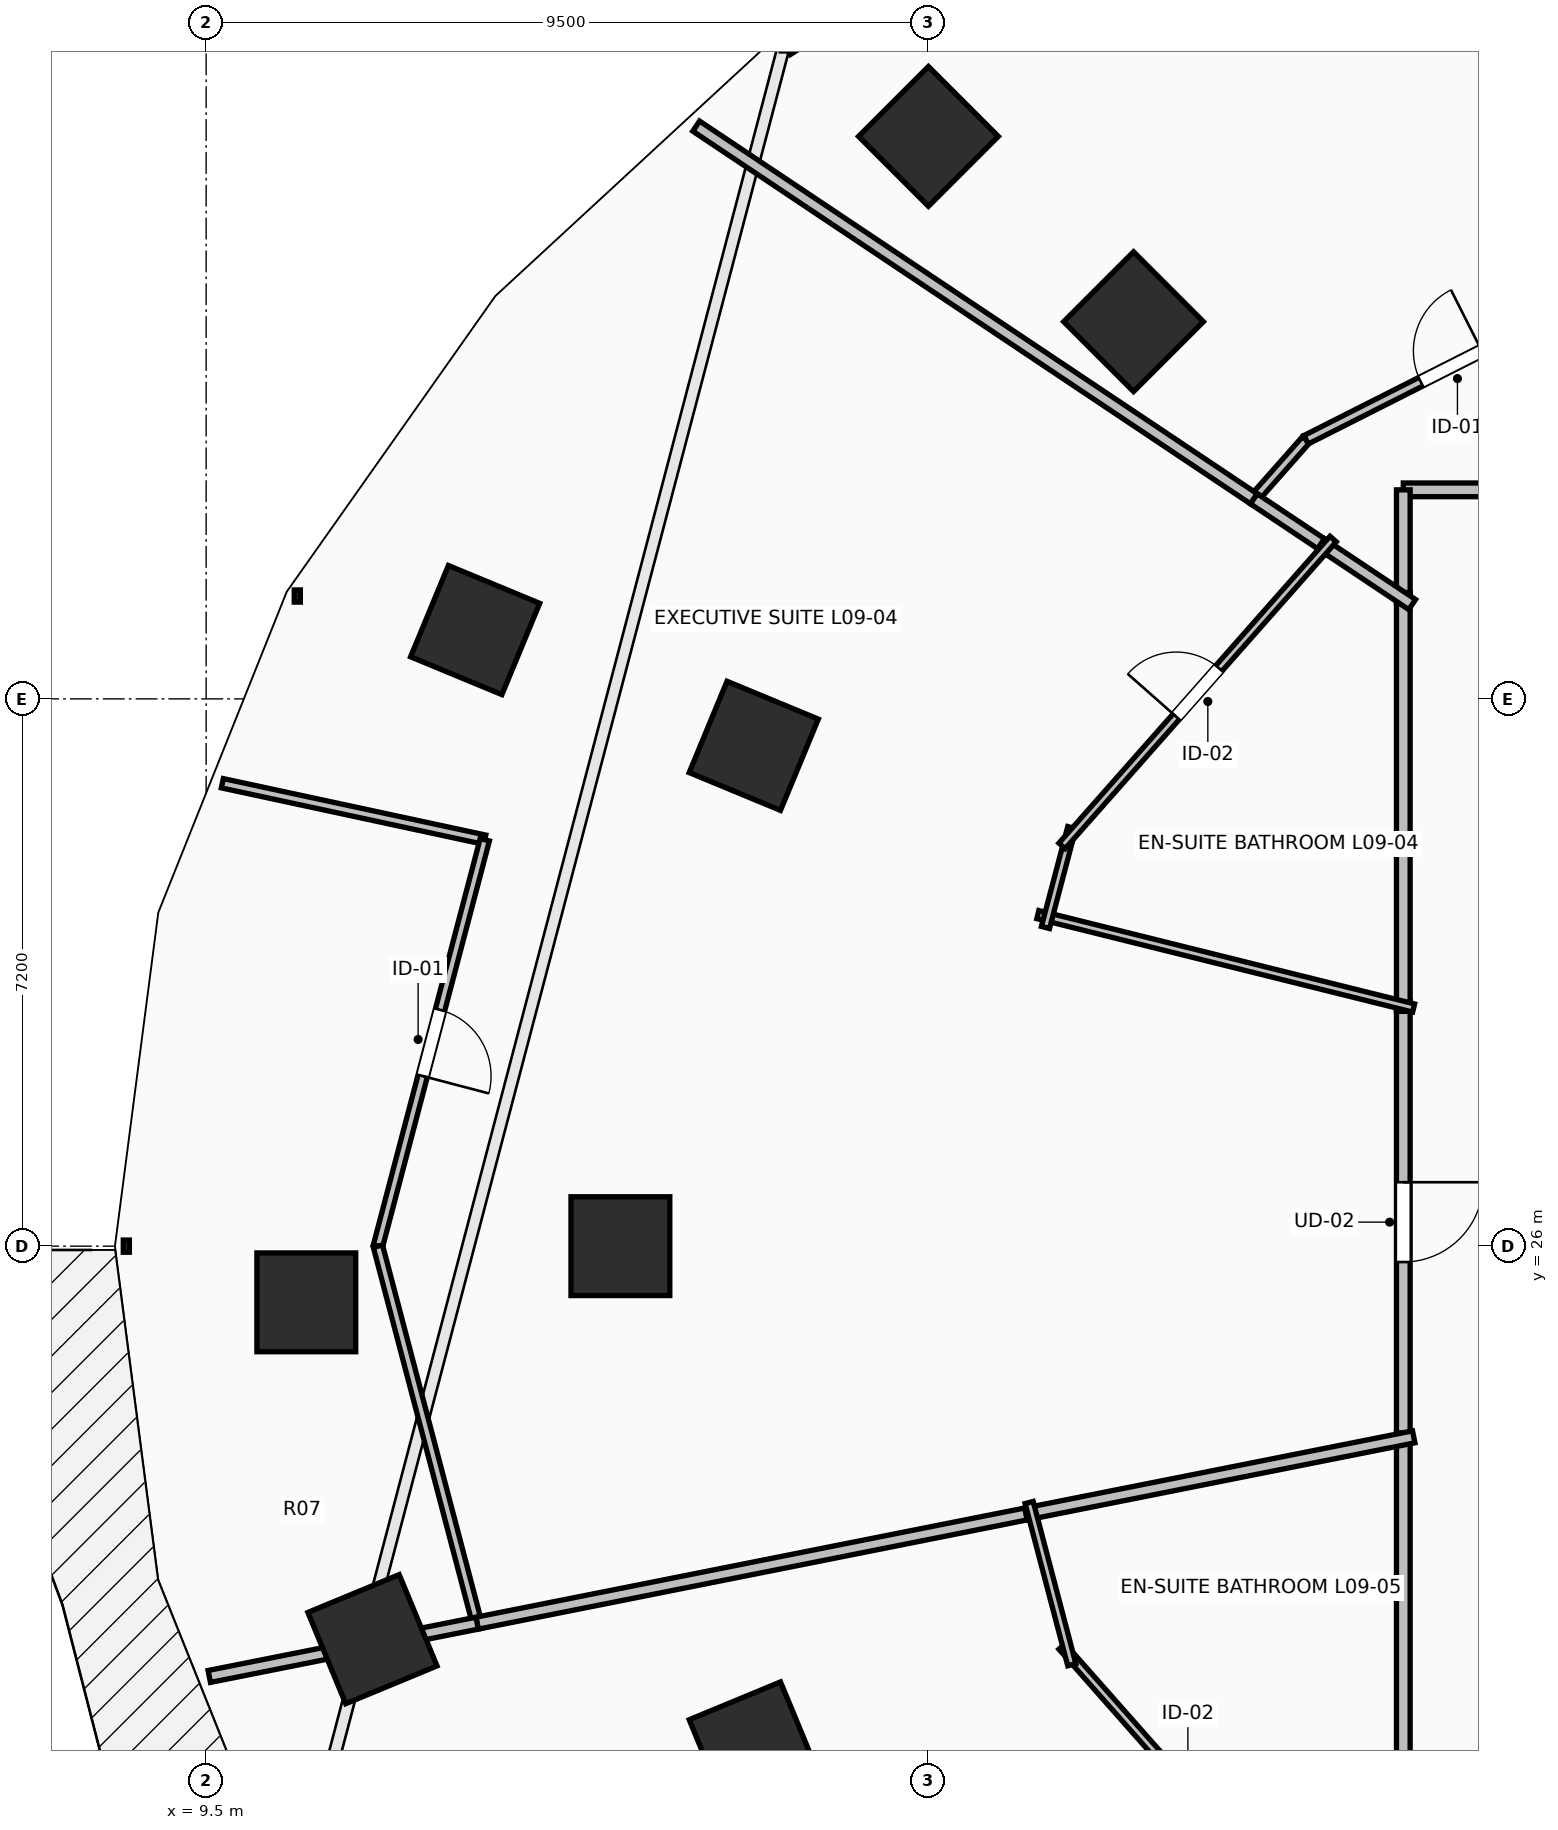
"""IFC4 building model, lengths in metres.
Left out: names, types, materials, properties, quantities, classifications, styles, units other than length and angle.
Written with IfcOpenShell. Run it as: python <this file> out.ifc"""

import sys

from ifc_helpers import new_model, si_unit, direction, frame, frame_2d, origin, origin_2d, place, context, subcontext, project, spatial, rectangle, extrude, element, fill, save


model = new_model("IFC4")
c1 = context("Model", 3, precision=1e-05, world=origin(), true_north=direction((0.0, 1.0)))
c2 = subcontext(c1, "Body", "Model", "MODEL_VIEW")
j1 = project(units=[si_unit("LENGTHUNIT", "METRE"), si_unit("PLANEANGLEUNIT", "RADIAN")], contexts=[c1])
p1 = place(None, origin())
s1 = spatial("IfcSite", under=j1, at=p1, CompositionType="ELEMENT")
p2 = place(p1, origin())
s2 = spatial("IfcBuilding", under=s1, at=p2, CompositionType="ELEMENT")
p3 = place(p2, frame((0.0, 0.0, 38.0)))
s3 = spatial("IfcBuildingStorey", under=s2, at=p3, CompositionType="ELEMENT", Elevation=38.0)
for number, where, z_axis, x_axis in (
    (1, (21.701, 38.162, 0.0), (0.0, 0.0, 1.0), (-0.707, 0.707, 0.0)),
    (2, (16.705, 32.582, 0.0), (0.0, 0.0, 1.0), (-0.924, 0.383, 0.0)),
    (3, (14.95, 26.0, 0.0), (0.0, 0.0, 1.0), (-1.0, 0.0, 0.0)),
    (4, (16.705, 19.418, 0.0), (0.0, 0.0, 1.0), (-0.924, -0.383, 0.0)),
    (5, (19.003, 40.6, 0.0), (0.0, 0.0, 1.0), (-0.707, 0.707, 0.0)),
    (6, (13.039, 34.105, 0.0), (0.0, 0.0, 1.0), (-0.924, 0.383, 0.0)),
    (7, (10.818, 25.261, 0.0), (0.0, 0.0, 1.0), (-1.0, 0.0, 0.0)),
    (8, (11.688, 20.83, 0.0), (0.0, 0.0, 1.0), (-0.924, -0.383, 0.0)),
):
    element("IfcColumn", number, at=place(p3, frame(where, z_axis=z_axis, x_axis=x_axis)), inside=s3, PredefinedType="COLUMN", context=c2, shape_type="SweptSolid", body=[
        extrude(rectangle(XDim=1.3, YDim=1.3, at=origin_2d()), origin(), (0.0, 0.0, 1.0), 3.5),
    ])
p4 = place(p3, frame((21.583, 44.583, 0.0), z_axis=(0.0, 0.0, 1.0), x_axis=(-0.849633724826, -0.527373239404, 0.0)))
e9 = element("IfcWall", 9, at=p4, inside=s3, PredefinedType="STANDARD", context=c2, shape_type="SweptSolid", body=[
    extrude(rectangle(XDim=5.271, YDim=0.3, at=frame_2d((2.635, 0.0))), origin(), (0.0, 0.0, 1.0), 3.24),
])
p5 = place(p4, frame((1.885, 0.0, 0.85)))
e10 = element("IfcOpeningElement", 10, at=p5, cuts=e9, PredefinedType="OPENING", context=c2, shape_type="SweptSolid", body=[
    extrude(rectangle(XDim=1.5, YDim=2.19, at=frame_2d((0.75, 1.095))), frame((0.0, 0.165, 0.0), z_axis=(0.0, -1.0, 0.0), x_axis=(1.0, 0.0, 0.0)), (0.0, 0.0, 1.0), 0.33),
])
p6 = place(p3, frame((29.822, 35.95, 0.0), z_axis=(0.0, 0.0, 1.0), x_axis=(-1.0, 0.0, 0.0)))
e11 = element("IfcWall", 11, at=p6, inside=s3, PredefinedType="PARTITIONING", context=c2, shape_type="SweptSolid", body=[
    extrude(rectangle(XDim=4.572, YDim=0.18, at=frame_2d((2.286, 0.0))), origin(), (0.0, 0.0, 1.0), 2.432),
])
p7 = place(p6, frame((1.786, 0.0, 0.0)))
e12 = element("IfcOpeningElement", 12, at=p7, cuts=e11, PredefinedType="OPENING", context=c2, shape_type="SweptSolid", body=[
    extrude(rectangle(XDim=1.0, YDim=2.15, at=frame_2d((0.5, 1.075))), frame((0.0, 0.105, 0.0), z_axis=(0.0, -1.0, 0.0), x_axis=(1.0, 0.0, 0.0)), (0.0, 0.0, 1.0), 0.21),
])
p8 = place(p3, frame((25.25, 35.95, 0.0), z_axis=(0.0, 0.0, 1.0), x_axis=(0.0, -1.0, 0.0)))
e13 = element("IfcWall", 13, at=p8, inside=s3, PredefinedType="PARTITIONING", context=c2, shape_type="SweptSolid", body=[
    extrude(rectangle(XDim=1.491, YDim=0.18, at=frame_2d((0.746, 0.0))), origin(), (0.0, 0.0, 1.0), 2.432),
])
p9 = place(p3, frame((25.25, 29.229, 0.0), z_axis=(0.0, 0.0, 1.0), x_axis=(0.0, -1.0, 0.0)))
e14 = element("IfcWall", 14, at=p9, inside=s3, PredefinedType="PARTITIONING", context=c2, shape_type="SweptSolid", body=[
    extrude(rectangle(XDim=5.826, YDim=0.18, at=frame_2d((2.913, 0.0))), origin(), (0.0, 0.0, 1.0), 2.432),
])
p10 = place(p9, frame((2.388, 0.0, 0.0)))
e15 = element("IfcOpeningElement", 15, at=p10, cuts=e14, PredefinedType="OPENING", context=c2, shape_type="SweptSolid", body=[
    extrude(rectangle(XDim=1.05, YDim=2.2, at=frame_2d((0.525, 1.1))), frame((0.0, 0.105, 0.0), z_axis=(0.0, -1.0, 0.0), x_axis=(1.0, 0.0, 0.0)), (0.0, 0.0, 1.0), 0.21),
])
p11 = place(p3, frame((25.25, 34.599, 0.0), z_axis=(0.0, 0.0, 1.0), x_axis=(0.0, -1.0, 0.0)))
e16 = element("IfcWall", 16, at=p11, inside=s3, PredefinedType="PARTITIONING", context=c2, shape_type="SweptSolid", body=[
    extrude(rectangle(XDim=5.51, YDim=0.18, at=frame_2d((2.755, 0.0))), origin(), (0.0, 0.0, 1.0), 2.432),
])
p12 = place(p3, frame((25.25, 23.543, 0.0), z_axis=(0.0, 0.0, 1.0), x_axis=(0.0, -1.0, 0.0)))
e17 = element("IfcWall", 17, at=p12, inside=s3, PredefinedType="PARTITIONING", context=c2, shape_type="SweptSolid", body=[
    extrude(rectangle(XDim=5.299, YDim=0.18, at=frame_2d((2.649, 0.0))), origin(), (0.0, 0.0, 1.0), 3.24),
])
p13 = place(p3, frame((23.284, 35.832, 0.0), z_axis=(0.0, 0.0, 1.0), x_axis=(0.662462125237, 0.749095409561, 0.0)))
e18 = element("IfcWall", 18, at=p13, inside=s3, PredefinedType="PARTITIONING", context=c2, shape_type="SweptSolid", body=[
    extrude(rectangle(XDim=1.037, YDim=0.125, at=frame_2d((0.519, 0.0))), origin(), (0.0, 0.0, 1.0), 2.432),
])
p14 = place(p3, frame((23.971, 36.609, 0.0), z_axis=(0.0, 0.0, 1.0), x_axis=(0.892445030909, 0.451156144596, 0.0)))
e19 = element("IfcWall", 19, at=p14, inside=s3, PredefinedType="PARTITIONING", context=c2, shape_type="SweptSolid", body=[
    extrude(rectangle(XDim=4.281, YDim=0.125, at=frame_2d((2.14, 0.0))), origin(), (0.0, 0.0, 1.0), 3.24),
])
p15 = place(p14, frame((1.69, 0.0, 0.0)))
e20 = element("IfcOpeningElement", 20, at=p15, cuts=e19, PredefinedType="OPENING", context=c2, shape_type="SweptSolid", body=[
    extrude(rectangle(XDim=0.9, YDim=2.1, at=frame_2d((0.45, 1.05))), frame((0.0, 0.077, 0.0), z_axis=(0.0, -1.0, 0.0), x_axis=(1.0, 0.0, 0.0)), (0.0, 0.0, 1.0), 0.155),
])
p16 = place(p3, frame((15.947, 40.735, 0.0), z_axis=(0.0, 0.0, 1.0), x_axis=(0.831432604336, -0.555625615363, 0.0)))
e21 = element("IfcWall", 21, at=p16, inside=s3, PredefinedType="PARTITIONING", context=c2, shape_type="SweptSolid", body=[
    extrude(rectangle(XDim=8.824, YDim=0.16, at=frame_2d((4.412, 0.0))), origin(), (0.0, 0.0, 1.0), 2.624),
])
p17 = place(p3, frame((23.284, 35.832, 0.0), z_axis=(0.0, 0.0, 1.0), x_axis=(0.831550226979, -0.555449565677, 0.0)))
e22 = element("IfcWall", 22, at=p17, inside=s3, PredefinedType="PARTITIONING", context=c2, shape_type="SweptSolid", body=[
    extrude(rectangle(XDim=1.203, YDim=0.16, at=frame_2d((0.601, 0.0))), origin(), (0.0, 0.0, 1.0), 2.972),
])
p18 = place(p3, frame((24.167, 35.241, 0.0), z_axis=(0.0, 0.0, 1.0), x_axis=(0.831815696492, -0.555051931868, 0.0)))
e23 = element("IfcWall", 23, at=p18, inside=s3, PredefinedType="PARTITIONING", context=c2, shape_type="SweptSolid", body=[
    extrude(rectangle(XDim=1.441, YDim=0.16, at=frame_2d((0.721, 0.0))), origin(), (0.0, 0.0, 1.0), 2.972),
])
p19 = place(p3, frame((25.386, 29.133, 0.0), z_axis=(0.0, 0.0, 1.0), x_axis=(-0.970485458541, 0.241159645796, 0.0)))
e24 = element("IfcWall", 24, at=p19, inside=s3, PredefinedType="PARTITIONING", context=c2, shape_type="SweptSolid", body=[
    extrude(rectangle(XDim=5.094, YDim=0.11, at=frame_2d((2.547, 0.0))), origin(), (0.0, 0.0, 1.0), 2.432),
])
p20 = place(p3, frame((20.542, 30.193, 0.0), z_axis=(0.0, 0.0, 1.0), x_axis=(0.254988593673, 0.966944060997, 0.0)))
e25 = element("IfcWall", 25, at=p20, inside=s3, PredefinedType="PARTITIONING", context=c2, shape_type="SweptSolid", body=[
    extrude(rectangle(XDim=1.359, YDim=0.11, at=frame_2d((0.679, 0.0))), origin(), (0.0, 0.0, 1.0), 2.432),
])
p21 = place(p3, frame((20.76, 31.266, 0.0), z_axis=(0.0, 0.0, 1.0), x_axis=(0.662087707802, 0.749426358742, 0.0)))
e26 = element("IfcWall", 26, at=p21, inside=s3, PredefinedType="PARTITIONING", context=c2, shape_type="SweptSolid", body=[
    extrude(rectangle(XDim=5.387, YDim=0.11, at=frame_2d((2.693, 0.0))), origin(), (0.0, 0.0, 1.0), 2.972),
])
p22 = place(p21, frame((2.268, 0.0, 0.0)))
e27 = element("IfcOpeningElement", 27, at=p22, cuts=e26, PredefinedType="OPENING", context=c2, shape_type="SweptSolid", body=[
    extrude(rectangle(XDim=0.85, YDim=2.1, at=frame_2d((0.425, 1.05))), frame((0.0, 0.07, 0.0), z_axis=(0.0, -1.0, 0.0), x_axis=(1.0, 0.0, 0.0)), (0.0, 0.0, 1.0), 0.14),
])
p23 = place(p3, frame((9.713, 32.09, 0.0), z_axis=(0.0, 0.0, 1.0), x_axis=(0.977615913399, -0.210397542448, 0.0)))
e28 = element("IfcWall", 28, at=p23, inside=s3, PredefinedType="PARTITIONING", context=c2, shape_type="SweptSolid", body=[
    extrude(rectangle(XDim=3.532, YDim=0.125, at=frame_2d((1.766, 0.0))), origin(), (0.0, 0.0, 1.0), 2.624),
])
p24 = place(p3, frame((13.166, 31.347, 0.0), z_axis=(0.0, 0.0, 1.0), x_axis=(-0.25431071056, -0.967122568496, 0.0)))
e29 = element("IfcWall", 29, at=p24, inside=s3, PredefinedType="PARTITIONING", context=c2, shape_type="SweptSolid", body=[
    extrude(rectangle(XDim=5.529, YDim=0.125, at=frame_2d((2.764, 0.0))), origin(), (0.0, 0.0, 1.0), 3.24),
])
p25 = place(p24, frame((2.314, 0.0, 0.0)))
e30 = element("IfcOpeningElement", 30, at=p25, cuts=e29, PredefinedType="OPENING", context=c2, shape_type="SweptSolid", body=[
    extrude(rectangle(XDim=0.9, YDim=2.1, at=frame_2d((0.45, 1.05))), frame((0.0, 0.077, 0.0), z_axis=(0.0, -1.0, 0.0), x_axis=(1.0, 0.0, 0.0)), (0.0, 0.0, 1.0), 0.155),
])
p26 = place(p3, frame((11.76, 26.0, 0.0), z_axis=(0.0, 0.0, 1.0), x_axis=(0.254434720755, -0.967089950767, 0.0)))
e31 = element("IfcWall", 31, at=p26, inside=s3, PredefinedType="PARTITIONING", context=c2, shape_type="SweptSolid", body=[
    extrude(rectangle(XDim=5.129, YDim=0.125, at=frame_2d((2.564, 0.0))), origin(), (0.0, 0.0, 1.0), 2.432),
])
p27 = place(p3, frame((13.065, 21.04, 0.0), z_axis=(0.0, 0.0, 1.0), x_axis=(0.980774220135, 0.195145917502, 0.0)))
e32 = element("IfcWall", 32, at=p27, inside=s3, PredefinedType="PARTITIONING", context=c2, shape_type="SweptSolid", body=[
    extrude(rectangle(XDim=7.501, YDim=0.16, at=frame_2d((3.751, 0.0))), origin(), (0.0, 0.0, 1.0), 2.922),
])
p28 = place(p3, frame((20.285, 22.476, 0.0), z_axis=(0.0, 0.0, 1.0), x_axis=(0.980785905074, 0.195087181559, 0.0)))
e33 = element("IfcWall", 33, at=p28, inside=s3, PredefinedType="PARTITIONING", context=c2, shape_type="SweptSolid", body=[
    extrude(rectangle(XDim=5.202, YDim=0.16, at=frame_2d((2.601, 0.0))), origin(), (0.0, 0.0, 1.0), 2.972),
])
p29 = place(p3, frame((9.541, 20.339, 0.0), z_axis=(0.0, 0.0, 1.0), x_axis=(0.980786594985, 0.195083713053, 0.0)))
e34 = element("IfcWall", 34, at=p29, inside=s3, PredefinedType="PARTITIONING", context=c2, shape_type="SweptSolid", body=[
    extrude(rectangle(XDim=3.593, YDim=0.16, at=frame_2d((1.796, 0.0))), origin(), (0.0, 0.0, 1.0), 2.432),
])
p30 = place(p3, frame((23.802, 17.291, 0.0), z_axis=(0.0, 0.0, 1.0), x_axis=(-0.662071486681, 0.74944068913, 0.0)))
e35 = element("IfcWall", 35, at=p30, inside=s3, PredefinedType="PARTITIONING", context=c2, shape_type="SweptSolid", body=[
    extrude(rectangle(XDim=4.594, YDim=0.11, at=frame_2d((2.297, 0.0))), origin(), (0.0, 0.0, 1.0), 2.432),
])
p31 = place(p30, frame((1.872, 0.0, 0.0)))
e36 = element("IfcOpeningElement", 36, at=p31, cuts=e35, PredefinedType="OPENING", context=c2, shape_type="SweptSolid", body=[
    extrude(rectangle(XDim=0.85, YDim=2.1, at=frame_2d((0.425, 1.05))), frame((0.0, 0.07, 0.0), z_axis=(0.0, -1.0, 0.0), x_axis=(1.0, 0.0, 0.0)), (0.0, 0.0, 1.0), 0.14),
])
p32 = place(p3, frame((20.889, 20.494, 0.0), z_axis=(0.0, 0.0, 1.0), x_axis=(-0.254389812051, 0.967101764823, 0.0)))
e37 = element("IfcWall", 37, at=p32, inside=s3, PredefinedType="PARTITIONING", context=c2, shape_type="SweptSolid", body=[
    extrude(rectangle(XDim=2.206, YDim=0.11, at=frame_2d((1.103, 0.0))), origin(), (0.0, 0.0, 1.0), 3.24),
])
p33 = place(p10, origin())
e38 = element("IfcDoor", 38, at=p33, inside=s3, OperationType="SINGLE_SWING_LEFT", PredefinedType="DOOR", context=c2, shape_type="SweptSolid", body=[
    extrude(rectangle(XDim=1.05, YDim=2.2, at=frame_2d((0.525, 1.1))), frame((0.0, 0.025, 0.0), z_axis=(0.0, -1.0, 0.0), x_axis=(1.0, 0.0, 0.0)), (0.0, 0.0, 1.0), 0.05),
])
fill(e15, e38)
p34 = place(p15, origin())
e39 = element("IfcDoor", 39, at=p34, inside=s3, OperationType="SINGLE_SWING_RIGHT", PredefinedType="DOOR", context=c2, shape_type="SweptSolid", body=[
    extrude(rectangle(XDim=0.9, YDim=2.1, at=frame_2d((0.45, 1.05))), frame((0.0, 0.025, 0.0), z_axis=(0.0, -1.0, 0.0), x_axis=(1.0, 0.0, 0.0)), (0.0, 0.0, 1.0), 0.05),
])
fill(e20, e39)
p35 = place(p22, origin())
e40 = element("IfcDoor", 40, at=p35, inside=s3, OperationType="SINGLE_SWING_LEFT", PredefinedType="DOOR", context=c2, shape_type="SweptSolid", body=[
    extrude(rectangle(XDim=0.85, YDim=2.1, at=frame_2d((0.425, 1.05))), frame((0.0, 0.025, 0.0), z_axis=(0.0, -1.0, 0.0), x_axis=(1.0, 0.0, 0.0)), (0.0, 0.0, 1.0), 0.05),
])
fill(e27, e40)
p36 = place(p25, origin())
e41 = element("IfcDoor", 41, at=p36, inside=s3, OperationType="SINGLE_SWING_RIGHT", PredefinedType="DOOR", context=c2, shape_type="SweptSolid", body=[
    extrude(rectangle(XDim=0.9, YDim=2.1, at=frame_2d((0.45, 1.05))), frame((0.0, 0.025, 0.0), z_axis=(0.0, -1.0, 0.0), x_axis=(1.0, 0.0, 0.0)), (0.0, 0.0, 1.0), 0.05),
])
fill(e30, e41)
save(model, sys.argv[1])
